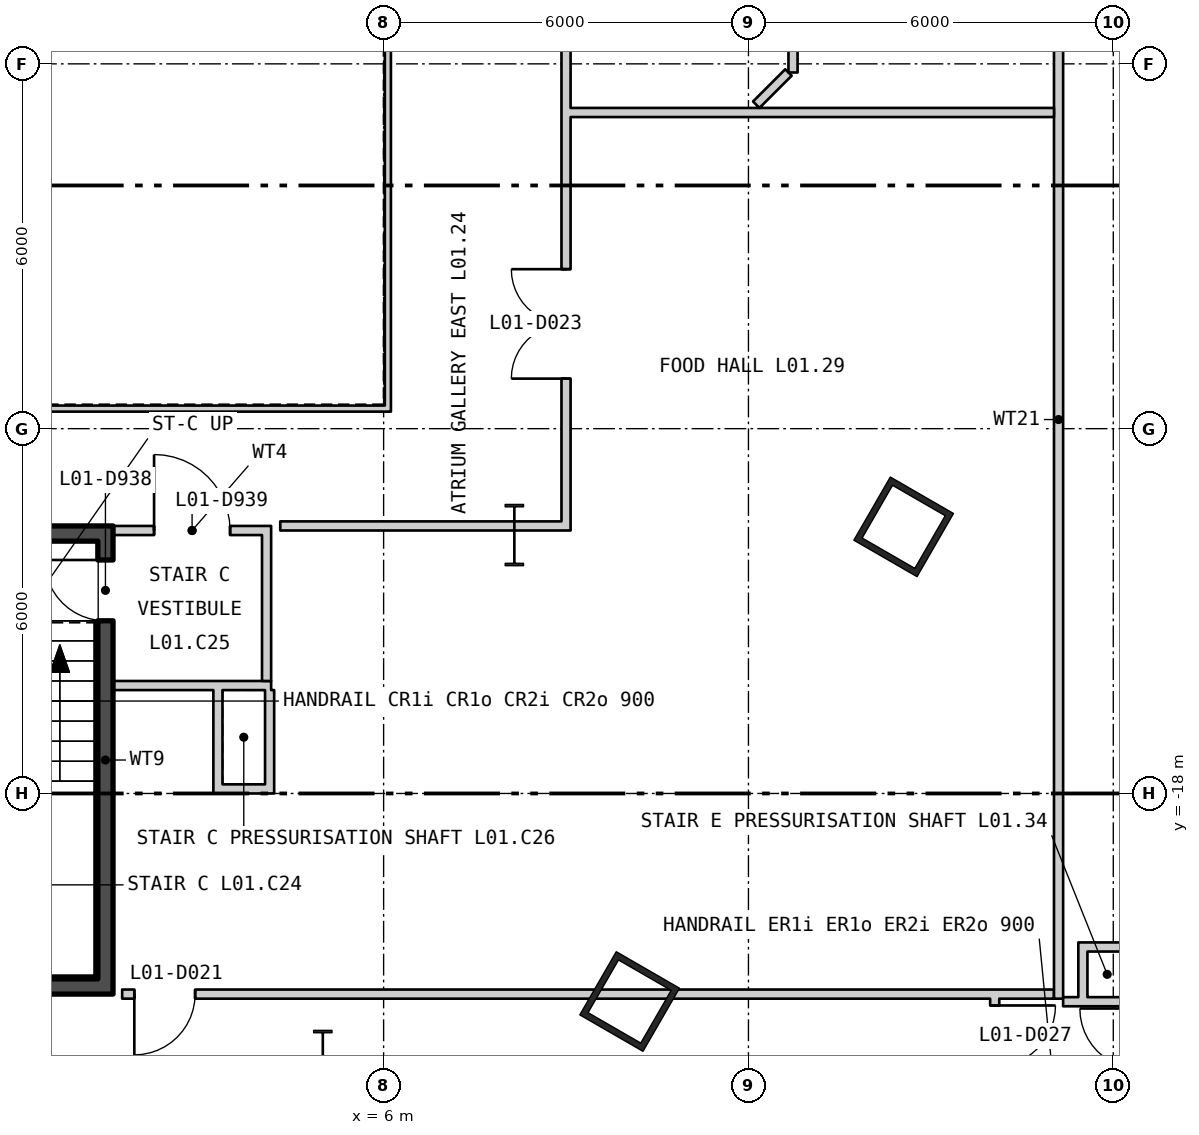
"""IFC4 building model, lengths in metres.
Left out: names, types, materials, properties, quantities, classifications, styles, units other than length and angle.
Written with IfcOpenShell. Run it as: python <this file> out.ifc"""

import sys

from ifc_helpers import new_model, si_unit, direction, frame, frame_2d, origin, origin_2d, place, context, subcontext, project, spatial, rectangle, hollow_rectangle, i_section, extrude, element, fill, save


model = new_model("IFC4")
c1 = context("Model", 3, precision=1e-05, world=origin(), true_north=direction((0.0, 1.0)))
c2 = subcontext(c1, "Body", "Model", "MODEL_VIEW")
j1 = project(units=[si_unit("LENGTHUNIT", "METRE"), si_unit("PLANEANGLEUNIT", "RADIAN")], contexts=[c1])
p1 = place(None, origin())
s1 = spatial("IfcSite", under=j1, at=p1, CompositionType="ELEMENT")
p2 = place(p1, origin())
s2 = spatial("IfcBuilding", under=s1, at=p2, CompositionType="ELEMENT")
p3 = place(p2, frame((0.0, 0.0, 8.4)))
s3 = spatial("IfcBuildingStorey", under=s2, at=p3, CompositionType="ELEMENT", Elevation=8.4)
for number, where, z_axis, x_axis in (
    (1, (10.046, -21.422, 0.0), (0.0, 0.0, 1.0), (0.5, 0.866, 0.0)),
    (2, (14.553, -13.615, 0.0), (0.0, 0.0, 1.0), (0.5, 0.866, 0.0)),
):
    element("IfcColumn", number, at=place(p3, frame(where, z_axis=z_axis, x_axis=x_axis)), inside=s3, PredefinedType="COLUMN", context=c2, shape_type="SweptSolid", body=[
        extrude(hollow_rectangle(XDim=1.2, YDim=1.2, WallThickness=0.1, at=origin_2d()), origin(), (0.0, 0.0, 1.0), 5.1),
    ])
for number, where, z_axis, x_axis in (
    (3, (8.15, -13.75, 0.0), (0.0, 0.0, 1.0), (1.0, 0.0, 0.0)),
    (4, (5.0, -22.4, 0.0), (0.0, 0.0, 1.0), (1.0, 0.0, 0.0)),
):
    element("IfcColumn", number, at=place(p3, frame(where, z_axis=z_axis, x_axis=x_axis)), inside=s3, PredefinedType="COLUMN", context=c2, shape_type="SweptSolid", body=[
        extrude(i_section(OverallWidth=0.302, OverallDepth=1.008, WebThickness=0.021, FlangeThickness=0.04, at=origin_2d()), origin(), (0.0, 0.0, 1.0), 5.1),
    ])
p4 = place(p3, frame((-6.12, -11.67, 0.0), z_axis=(0.0, 0.0, 1.0), x_axis=(1.0, 0.0, 0.0)))
e5 = element("IfcWall", 5, at=p4, inside=s3, PredefinedType="PARTITIONING", context=c2, shape_type="SweptSolid", body=[
    extrude(rectangle(XDim=12.24, YDim=0.1, at=frame_2d((6.12, 0.0))), origin(), (0.0, 0.0, 1.0), 4.88),
])
p5 = place(p3, frame((6.07, -11.62, 0.0), z_axis=(0.0, 0.0, 1.0), x_axis=(0.0, 1.0, 0.0)))
e6 = element("IfcWall", 6, at=p5, inside=s3, PredefinedType="PARTITIONING", context=c2, shape_type="SweptSolid", body=[
    extrude(rectangle(XDim=8.04, YDim=0.1, at=frame_2d((4.02, 0.0))), origin(), (0.0, 0.0, 1.0), 4.88),
])
p6 = place(p3, frame((1.425, -21.05, 0.0), z_axis=(0.0, 0.0, 1.0), x_axis=(0.0, 1.0, 0.0)))
e7 = element("IfcWall", 7, at=p6, inside=s3, PredefinedType="SHEAR", context=c2, shape_type="SweptSolid", body=[
    extrude(rectangle(XDim=7.2, YDim=0.25, at=frame_2d((3.6, 0.0))), origin(), (0.0, 0.0, 1.0), 4.88),
])
p7 = place(p6, frame((5.89, 0.0, 0.0)))
e8 = element("IfcOpeningElement", 8, at=p7, cuts=e7, PredefinedType="OPENING", context=c2, shape_type="SweptSolid", body=[
    extrude(rectangle(XDim=1.0, YDim=2.1, at=frame_2d((0.5, 1.05))), frame((0.0, 0.135, 0.0), z_axis=(0.0, -1.0, 0.0), x_axis=(1.0, 0.0, 0.0)), (0.0, 0.0, 1.0), 0.27),
])
for number, where, z_axis, x_axis in (
    (9, (-1.55, -21.175, 0.0), (0.0, 0.0, 1.0), (1.0, 0.0, 0.0)),
    (10, (-1.55, -13.725, 0.0), (0.0, 0.0, 1.0), (1.0, 0.0, 0.0)),
):
    element("IfcWall", number, at=place(p3, frame(where, z_axis=z_axis, x_axis=x_axis)), inside=s3, PredefinedType="SHEAR", context=c2, shape_type="SweptSolid", body=[
        extrude(rectangle(XDim=3.1, YDim=0.25, at=frame_2d((1.55, 0.0))), origin(), (0.0, 0.0, 1.0), 4.88),
    ])
p8 = place(p3, frame((1.55, -16.225, 0.0), z_axis=(0.0, 0.0, 1.0), x_axis=(1.0, 0.0, 0.0)))
e11 = element("IfcWall", 11, at=p8, inside=s3, PredefinedType="PARTITIONING", context=c2, shape_type="SweptSolid", body=[
    extrude(rectangle(XDim=2.6, YDim=0.15, at=frame_2d((1.3, 0.0))), origin(), (0.0, 0.0, 1.0), 4.88),
])
p9 = place(p3, frame((4.075, -16.15, 0.0), z_axis=(0.0, 0.0, 1.0), x_axis=(0.0, 1.0, 0.0)))
e12 = element("IfcWall", 12, at=p9, inside=s3, PredefinedType="PARTITIONING", context=c2, shape_type="SweptSolid", body=[
    extrude(rectangle(XDim=2.4, YDim=0.15, at=frame_2d((1.2, 0.0))), origin(), (0.0, 0.0, 1.0), 4.88),
])
p10 = place(p3, frame((1.55, -13.675, 0.0), z_axis=(0.0, 0.0, 1.0), x_axis=(1.0, 0.0, 0.0)))
e13 = element("IfcWall", 13, at=p10, inside=s3, PredefinedType="PARTITIONING", context=c2, shape_type="SweptSolid", body=[
    extrude(rectangle(XDim=2.6, YDim=0.15, at=frame_2d((1.3, 0.0))), origin(), (0.0, 0.0, 1.0), 3.97),
])
p11 = place(p10, frame((0.675, 0.0, 0.0)))
e14 = element("IfcOpeningElement", 14, at=p11, cuts=e13, PredefinedType="OPENING", context=c2, shape_type="SweptSolid", body=[
    extrude(rectangle(XDim=1.25, YDim=2.1, at=frame_2d((0.625, 1.05))), frame((0.0, 0.085, 0.0), z_axis=(0.0, -1.0, 0.0), x_axis=(1.0, 0.0, 0.0)), (0.0, 0.0, 1.0), 0.17),
])
p12 = place(p3, frame((3.275, -18.0, 0.0), z_axis=(0.0, 0.0, 1.0), x_axis=(0.0, 1.0, 0.0)))
e15 = element("IfcWall", 15, at=p12, inside=s3, PredefinedType="PARTITIONING", context=c2, shape_type="SweptSolid", body=[
    extrude(rectangle(XDim=1.7, YDim=0.15, at=frame_2d((0.85, 0.0))), origin(), (0.0, 0.0, 1.0), 4.28),
])
p13 = place(p3, frame((3.35, -17.925, 0.0), z_axis=(0.0, 0.0, 1.0), x_axis=(1.0, 0.0, 0.0)))
e16 = element("IfcWall", 16, at=p13, inside=s3, PredefinedType="PARTITIONING", context=c2, shape_type="SweptSolid", body=[
    extrude(rectangle(XDim=0.7, YDim=0.15, at=frame_2d((0.35, 0.0))), origin(), (0.0, 0.0, 1.0), 4.88),
])
p14 = place(p3, frame((4.125, -18.0, 0.0), z_axis=(0.0, 0.0, 1.0), x_axis=(0.0, 1.0, 0.0)))
e17 = element("IfcWall", 17, at=p14, inside=s3, PredefinedType="PARTITIONING", context=c2, shape_type="SweptSolid", body=[
    extrude(rectangle(XDim=1.7, YDim=0.15, at=frame_2d((0.85, 0.0))), origin(), (0.0, 0.0, 1.0), 4.88),
])
p15 = place(p3, frame((1.7, -21.3, 0.0), z_axis=(0.0, 0.0, 1.0), x_axis=(1.0, 0.0, 0.0)))
e18 = element("IfcWall", 18, at=p15, inside=s3, PredefinedType="PARTITIONING", context=c2, shape_type="SweptSolid", body=[
    extrude(rectangle(XDim=15.325, YDim=0.15, at=frame_2d((7.662, 0.0))), origin(), (0.0, 0.0, 1.0), 4.88),
])
p16 = place(p15, frame((0.2, 0.0, 0.0)))
e19 = element("IfcOpeningElement", 19, at=p16, cuts=e18, PredefinedType="OPENING", context=c2, shape_type="SweptSolid", body=[
    extrude(rectangle(XDim=1.0, YDim=2.1, at=frame_2d((0.5, 1.05))), frame((0.0, 0.085, 0.0), z_axis=(0.0, -1.0, 0.0), x_axis=(1.0, 0.0, 0.0)), (0.0, 0.0, 1.0), 0.17),
])
p17 = place(p3, frame((4.3, -13.6, 0.0), z_axis=(0.0, 0.0, 1.0), x_axis=(1.0, 0.0, 0.0)))
e20 = element("IfcWall", 20, at=p17, inside=s3, PredefinedType="PARTITIONING", context=c2, shape_type="SweptSolid", body=[
    extrude(rectangle(XDim=3.85, YDim=0.15, at=frame_2d((1.925, 0.0))), origin(), (0.0, 0.0, 1.0), 3.97),
])
p18 = place(p3, frame((8.15, -13.6, 0.0), z_axis=(0.0, 0.0, 1.0), x_axis=(1.0, 0.0, 0.0)))
e21 = element("IfcWall", 21, at=p18, inside=s3, PredefinedType="PARTITIONING", context=c2, shape_type="SweptSolid", body=[
    extrude(rectangle(XDim=0.775, YDim=0.15, at=frame_2d((0.388, 0.0))), origin(), (0.0, 0.0, 1.0), 4.09),
])
p19 = place(p3, frame((9.0, -13.675, 0.0), z_axis=(0.0, 0.0, 1.0), x_axis=(0.0, 1.0, 0.0)))
e22 = element("IfcWall", 22, at=p19, inside=s3, PredefinedType="PARTITIONING", context=c2, shape_type="SweptSolid", body=[
    extrude(rectangle(XDim=11.287, YDim=0.15, at=frame_2d((5.644, 0.0))), origin(), (0.0, 0.0, 1.0), 4.88),
])
p20 = place(p19, frame((2.498, 0.0, 0.0)))
e23 = element("IfcOpeningElement", 23, at=p20, cuts=e22, PredefinedType="OPENING", context=c2, shape_type="SweptSolid", body=[
    extrude(rectangle(XDim=1.8, YDim=2.1, at=frame_2d((0.9, 1.05))), frame((0.0, 0.085, 0.0), z_axis=(0.0, -1.0, 0.0), x_axis=(1.0, 0.0, 0.0)), (0.0, 0.0, 1.0), 0.17),
])
p21 = place(p3, frame((9.075, -6.8, 0.0), z_axis=(0.0, 0.0, 1.0), x_axis=(1.0, 0.0, 0.0)))
e24 = element("IfcWall", 24, at=p21, inside=s3, PredefinedType="PARTITIONING", context=c2, shape_type="SweptSolid", body=[
    extrude(rectangle(XDim=7.95, YDim=0.15, at=frame_2d((3.975, 0.0))), origin(), (0.0, 0.0, 1.0), 4.88),
])
p22 = place(p3, frame((12.128, -6.672, 0.0), z_axis=(0.0, 0.0, 1.0), x_axis=(0.707106781187, 0.707106781187, 0.0)))
e25 = element("IfcWall", 25, at=p22, inside=s3, PredefinedType="PARTITIONING", context=c2, shape_type="SweptSolid", body=[
    extrude(rectangle(XDim=0.75, YDim=0.15, at=frame_2d((0.375, 0.0))), origin(), (0.0, 0.0, 1.0), 4.88),
])
p23 = place(p3, frame((12.733, -6.142, 0.0), z_axis=(0.0, 0.0, 1.0), x_axis=(0.0, 1.0, 0.0)))
e26 = element("IfcWall", 26, at=p23, inside=s3, PredefinedType="PARTITIONING", context=c2, shape_type="SweptSolid", body=[
    extrude(rectangle(XDim=3.042, YDim=0.15, at=frame_2d((1.521, 0.0))), origin(), (0.0, 0.0, 1.0), 4.19),
])
p24 = place(p3, frame((16.05, -23.55, 0.0), z_axis=(0.0, 0.0, 1.0), x_axis=(0.0, 1.0, 0.0)))
e27 = element("IfcWall", 27, at=p24, inside=s3, PredefinedType="PARTITIONING", context=c2, shape_type="SweptSolid", body=[
    extrude(rectangle(XDim=2.175, YDim=0.15, at=frame_2d((1.087, 0.0))), origin(), (0.0, 0.0, 1.0), 4.88),
])
p25 = place(p24, frame((1.063, 0.0, 0.0)))
e28 = element("IfcOpeningElement", 28, at=p25, cuts=e27, PredefinedType="OPENING", context=c2, shape_type="SweptSolid", body=[
    extrude(rectangle(XDim=1.0, YDim=2.1, at=frame_2d((0.5, 1.05))), frame((0.0, 0.085, 0.0), z_axis=(0.0, -1.0, 0.0), x_axis=(1.0, 0.0, 0.0)), (0.0, 0.0, 1.0), 0.17),
])
p26 = place(p3, frame((17.1, -21.375, 0.0), z_axis=(0.0, 0.0, 1.0), x_axis=(0.0, 1.0, 0.0)))
e29 = element("IfcWall", 29, at=p26, inside=s3, PredefinedType="PARTITIONING", context=c2, shape_type="SweptSolid", body=[
    extrude(rectangle(XDim=19.05, YDim=0.15, at=frame_2d((9.525, 0.0))), origin(), (0.0, 0.0, 1.0), 4.88),
])
p27 = place(p3, frame((17.175, -21.425, 0.0), z_axis=(0.0, 0.0, 1.0), x_axis=(1.0, 0.0, 0.0)))
e30 = element("IfcWall", 30, at=p27, inside=s3, PredefinedType="PARTITIONING", context=c2, shape_type="SweptSolid", body=[
    extrude(rectangle(XDim=0.25, YDim=0.15, at=frame_2d((0.125, 0.0))), origin(), (0.0, 0.0, 1.0), 4.88),
])
p28 = place(p3, frame((17.5, -21.5, 0.0), z_axis=(0.0, 0.0, 1.0), x_axis=(0.0, 1.0, 0.0)))
e31 = element("IfcWall", 31, at=p28, inside=s3, PredefinedType="PARTITIONING", context=c2, shape_type="SweptSolid", body=[
    extrude(rectangle(XDim=1.05, YDim=0.15, at=frame_2d((0.525, 0.0))), origin(), (0.0, 0.0, 1.0), 4.88),
])
for number, where, z_axis, x_axis in (
    (32, (17.575, -21.425, 0.0), (0.0, 0.0, 1.0), (1.0, 0.0, 0.0)),
    (33, (17.575, -20.525, 0.0), (0.0, 0.0, 1.0), (1.0, 0.0, 0.0)),
):
    element("IfcWall", number, at=place(p3, frame(where, z_axis=z_axis, x_axis=x_axis)), inside=s3, PredefinedType="PARTITIONING", context=c2, shape_type="SweptSolid", body=[
        extrude(rectangle(XDim=0.65, YDim=0.15, at=frame_2d((0.325, 0.0))), origin(), (0.0, 0.0, 1.0), 4.88),
    ])
p29 = place(p7, origin())
e34 = element("IfcDoor", 34, at=p29, inside=s3, OperationType="SINGLE_SWING_LEFT", PredefinedType="DOOR", context=c2, shape_type="SweptSolid", body=[
    extrude(rectangle(XDim=1.0, YDim=2.1, at=frame_2d((0.5, 1.05))), frame((0.0, 0.025, 0.0), z_axis=(0.0, -1.0, 0.0), x_axis=(1.0, 0.0, 0.0)), (0.0, 0.0, 1.0), 0.05),
])
fill(e8, e34)
p30 = place(p11, origin())
e35 = element("IfcDoor", 35, at=p30, inside=s3, OperationType="SINGLE_SWING_RIGHT", PredefinedType="DOOR", context=c2, shape_type="SweptSolid", body=[
    extrude(rectangle(XDim=1.25, YDim=2.1, at=frame_2d((0.625, 1.05))), frame((0.0, 0.025, 0.0), z_axis=(0.0, -1.0, 0.0), x_axis=(1.0, 0.0, 0.0)), (0.0, 0.0, 1.0), 0.05),
])
fill(e14, e35)
p31 = place(p16, origin())
e36 = element("IfcDoor", 36, at=p31, inside=s3, OperationType="SINGLE_SWING_LEFT", PredefinedType="DOOR", context=c2, shape_type="SweptSolid", body=[
    extrude(rectangle(XDim=1.0, YDim=2.1, at=frame_2d((0.5, 1.05))), frame((0.0, 0.025, 0.0), z_axis=(0.0, -1.0, 0.0), x_axis=(1.0, 0.0, 0.0)), (0.0, 0.0, 1.0), 0.05),
])
fill(e19, e36)
p32 = place(p20, origin())
e37 = element("IfcDoor", 37, at=p32, inside=s3, OperationType="DOUBLE_DOOR_SINGLE_SWING", PredefinedType="DOOR", context=c2, shape_type="SweptSolid", body=[
    extrude(rectangle(XDim=1.8, YDim=2.1, at=frame_2d((0.9, 1.05))), frame((0.0, 0.025, 0.0), z_axis=(0.0, -1.0, 0.0), x_axis=(1.0, 0.0, 0.0)), (0.0, 0.0, 1.0), 0.05),
])
fill(e23, e37)
p33 = place(p25, origin())
e38 = element("IfcDoor", 38, at=p33, inside=s3, OperationType="SINGLE_SWING_RIGHT", PredefinedType="DOOR", context=c2, shape_type="SweptSolid", body=[
    extrude(rectangle(XDim=1.0, YDim=2.1, at=frame_2d((0.5, 1.05))), frame((0.0, 0.025, 0.0), z_axis=(0.0, -1.0, 0.0), x_axis=(1.0, 0.0, 0.0)), (0.0, 0.0, 1.0), 0.05),
])
fill(e28, e38)
save(model, sys.argv[1])
